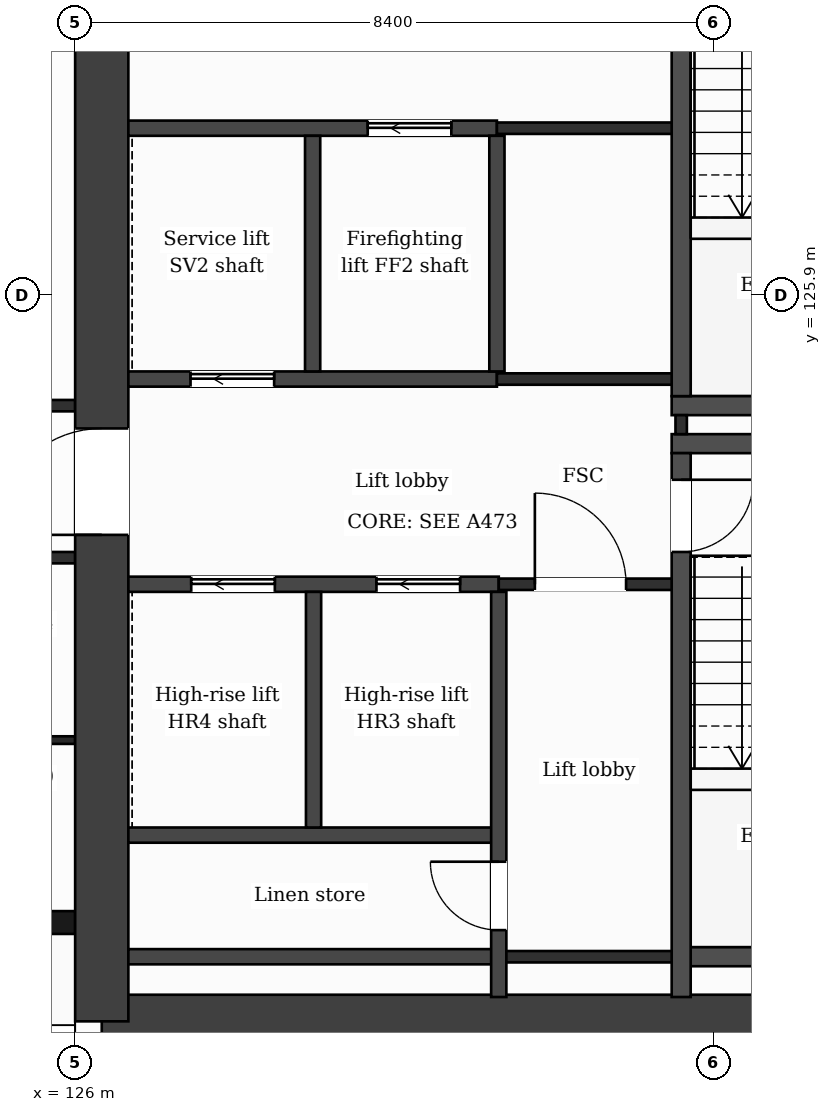
"""IFC4 building model, lengths in metres.
Left out: names, types, materials, properties, quantities, classifications, styles, units other than length and angle.
Written with IfcOpenShell. Run it as: python <this file> out.ifc"""

import sys

from ifc_helpers import new_model, si_unit, direction, frame, frame_2d, origin, place, context, subcontext, project, spatial, rectangle, extrude, element, fill, save


model = new_model("IFC4")
c1 = context("Model", 3, precision=1e-05, world=origin(), true_north=direction((0.0, 1.0)))
c2 = subcontext(c1, "Body", "Model", "MODEL_VIEW")
j1 = project(units=[si_unit("LENGTHUNIT", "METRE"), si_unit("PLANEANGLEUNIT", "RADIAN")], contexts=[c1])
p1 = place(None, origin())
s1 = spatial("IfcSite", under=j1, at=p1, CompositionType="ELEMENT")
p2 = place(p1, origin())
s2 = spatial("IfcBuilding", under=s1, at=p2, CompositionType="ELEMENT")
p3 = place(p2, frame((0.0, 0.0, 296.0)))
s3 = spatial("IfcBuildingStorey", under=s2, at=p3, CompositionType="ELEMENT", Elevation=296.0)
p4 = place(p3, frame((139.977, 116.35, 0.0), z_axis=(0.0, 0.0, 1.0), x_axis=(-1.0, 0.0, 0.0)))
e1 = element("IfcWall", 1, at=p4, inside=s3, PredefinedType="SHEAR", context=c2, shape_type="SweptSolid", body=[
    extrude(rectangle(XDim=13.626, YDim=0.7, at=frame_2d((6.813, 0.0))), origin(), (0.0, 0.0, 1.0), 3.7),
])
p5 = place(p3, frame((126.35, 116.35, 0.0), z_axis=(0.0, 0.0, 1.0), x_axis=(0.0, 1.0, 0.0)))
e2 = element("IfcWall", 2, at=p5, inside=s3, PredefinedType="SHEAR", context=c2, shape_type="SweptSolid", body=[
    extrude(rectangle(XDim=15.7, YDim=0.7, at=frame_2d((7.85, 0.0))), origin(), (0.0, 0.0, 1.0), 3.7),
])
p6 = place(p5, frame((6.4, 0.0, 0.0)))
e3 = element("IfcOpeningElement", 3, at=p6, cuts=e2, PredefinedType="OPENING", context=c2, shape_type="SweptSolid", body=[
    extrude(rectangle(XDim=1.4, YDim=2.1, at=frame_2d((0.7, 1.05))), frame((0.0, 0.36, 0.0), z_axis=(0.0, -1.0, 0.0), x_axis=(1.0, 0.0, 0.0)), (0.0, 0.0, 1.0), 0.72),
])
p7 = place(p3, frame((100.8, 117.65, 0.0), z_axis=(0.0, 0.0, 1.0), x_axis=(1.0, 0.0, 0.0)))
e4 = element("IfcWall", 4, at=p7, inside=s3, PredefinedType="SOLIDWALL", context=c2, shape_type="SweptSolid", body=[
    extrude(rectangle(XDim=25.2, YDim=0.3, at=frame_2d((12.6, 0.0))), origin(), (0.0, 0.0, 1.0), 3.38),
])
p8 = place(p7, frame((1.55, 0.0, 0.9)))
e5 = element("IfcOpeningElement", 5, at=p8, cuts=e4, PredefinedType="OPENING", context=c2, shape_type="SweptSolid", body=[
    extrude(rectangle(XDim=1.2, YDim=2.1, at=frame_2d((0.6, 1.05))), frame((0.0, 0.16, 0.0), z_axis=(0.0, -1.0, 0.0), x_axis=(1.0, 0.0, 0.0)), (0.0, 0.0, 1.0), 0.32),
])
p9 = place(p7, frame((5.7, 0.0, 0.9)))
e6 = element("IfcOpeningElement", 6, at=p9, cuts=e4, PredefinedType="OPENING", context=c2, shape_type="SweptSolid", body=[
    extrude(rectangle(XDim=1.2, YDim=2.1, at=frame_2d((0.6, 1.05))), frame((0.0, 0.16, 0.0), z_axis=(0.0, -1.0, 0.0), x_axis=(1.0, 0.0, 0.0)), (0.0, 0.0, 1.0), 0.32),
])
p10 = place(p7, frame((9.0, 0.0, 0.0)))
e7 = element("IfcOpeningElement", 7, at=p10, cuts=e4, PredefinedType="OPENING", context=c2, shape_type="SweptSolid", body=[
    extrude(rectangle(XDim=1.2, YDim=2.4, at=frame_2d((0.6, 1.2))), frame((0.0, 0.16, 0.0), z_axis=(0.0, -1.0, 0.0), x_axis=(1.0, 0.0, 0.0)), (0.0, 0.0, 1.0), 0.32),
])
p11 = place(p7, frame((10.8, 0.0, 0.9)))
e8 = element("IfcOpeningElement", 8, at=p11, cuts=e4, PredefinedType="OPENING", context=c2, shape_type="SweptSolid", body=[
    extrude(rectangle(XDim=1.2, YDim=2.1, at=frame_2d((0.6, 1.05))), frame((0.0, 0.16, 0.0), z_axis=(0.0, -1.0, 0.0), x_axis=(1.0, 0.0, 0.0)), (0.0, 0.0, 1.0), 0.32),
])
p12 = place(p7, frame((13.5, 0.0, 0.9)))
e9 = element("IfcOpeningElement", 9, at=p12, cuts=e4, PredefinedType="OPENING", context=c2, shape_type="SweptSolid", body=[
    extrude(rectangle(XDim=2.4, YDim=2.1, at=frame_2d((1.2, 1.05))), frame((0.0, 0.16, 0.0), z_axis=(0.0, -1.0, 0.0), x_axis=(1.0, 0.0, 0.0)), (0.0, 0.0, 1.0), 0.32),
])
p13 = place(p7, frame((17.4, 0.0, 0.0)))
e10 = element("IfcOpeningElement", 10, at=p13, cuts=e4, PredefinedType="OPENING", context=c2, shape_type="SweptSolid", body=[
    extrude(rectangle(XDim=1.2, YDim=2.4, at=frame_2d((0.6, 1.2))), frame((0.0, 0.16, 0.0), z_axis=(0.0, -1.0, 0.0), x_axis=(1.0, 0.0, 0.0)), (0.0, 0.0, 1.0), 0.32),
])
p14 = place(p7, frame((19.2, 0.0, 0.9)))
e11 = element("IfcOpeningElement", 11, at=p14, cuts=e4, PredefinedType="OPENING", context=c2, shape_type="SweptSolid", body=[
    extrude(rectangle(XDim=1.2, YDim=2.1, at=frame_2d((0.6, 1.05))), frame((0.0, 0.16, 0.0), z_axis=(0.0, -1.0, 0.0), x_axis=(1.0, 0.0, 0.0)), (0.0, 0.0, 1.0), 0.32),
])
p15 = place(p7, frame((21.85, 0.0, 0.9)))
e12 = element("IfcOpeningElement", 12, at=p15, cuts=e4, PredefinedType="OPENING", context=c2, shape_type="SweptSolid", body=[
    extrude(rectangle(XDim=2.4, YDim=2.1, at=frame_2d((1.2, 1.05))), frame((0.0, 0.16, 0.0), z_axis=(0.0, -1.0, 0.0), x_axis=(1.0, 0.0, 0.0)), (0.0, 0.0, 1.0), 0.32),
])
p16 = place(p3, frame((126.7, 117.2, 0.0), z_axis=(0.0, 0.0, 1.0), x_axis=(1.0, 0.0, 0.0)))
e13 = element("IfcWall", 13, at=p16, inside=s3, PredefinedType="PARTITIONING", context=c2, shape_type="SweptSolid", body=[
    extrude(rectangle(XDim=4.873, YDim=0.2, at=frame_2d((2.437, 0.0))), origin(), (0.0, 0.0, 1.0), 3.38),
])
p17 = place(p3, frame((131.573, 117.2, 0.0), z_axis=(0.0, 0.0, 1.0), x_axis=(1.0, 0.0, 0.0)))
e14 = element("IfcWall", 14, at=p17, inside=s3, PredefinedType="PARTITIONING", context=c2, shape_type="SweptSolid", body=[
    extrude(rectangle(XDim=2.4, YDim=0.15, at=frame_2d((1.2, 0.0))), origin(), (0.0, 0.0, 1.0), 3.38),
])
p18 = place(p3, frame((133.973, 117.2, 0.0), z_axis=(0.0, 0.0, 1.0), x_axis=(1.0, 0.0, 0.0)))
e15 = element("IfcWall", 15, at=p18, inside=s3, PredefinedType="PARTITIONING", context=c2, shape_type="SweptSolid", body=[
    extrude(rectangle(XDim=3.275, YDim=0.25, at=frame_2d((1.638, 0.0))), origin(), (0.0, 0.0, 1.0), 3.38),
])
p19 = place(p3, frame((126.7, 118.8, 0.0), z_axis=(0.0, 0.0, 1.0), x_axis=(1.0, 0.0, 0.0)))
e16 = element("IfcWall", 16, at=p19, inside=s3, PredefinedType="PARTITIONING", context=c2, shape_type="SweptSolid", body=[
    extrude(rectangle(XDim=4.873, YDim=0.2, at=frame_2d((2.437, 0.0))), origin(), (0.0, 0.0, 1.0), 3.38),
])
p20 = place(p3, frame((123.25, 120.05, 0.0), z_axis=(0.0, 0.0, 1.0), x_axis=(1.0, 0.0, 0.0)))
e17 = element("IfcWall", 17, at=p20, inside=s3, PredefinedType="PARTITIONING", context=c2, shape_type="SweptSolid", body=[
    extrude(rectangle(XDim=2.75, YDim=0.1, at=frame_2d((1.375, 0.0))), origin(), (0.0, 0.0, 1.0), 3.38),
])
p21 = place(p20, frame((1.0, 0.0, 0.0)))
e18 = element("IfcOpeningElement", 18, at=p21, cuts=e17, PredefinedType="OPENING", context=c2, shape_type="SweptSolid", body=[
    extrude(rectangle(XDim=0.8, YDim=2.1, at=frame_2d((0.4, 1.05))), frame((0.0, 0.06, 0.0), z_axis=(0.0, -1.0, 0.0), x_axis=(1.0, 0.0, 0.0)), (0.0, 0.0, 1.0), 0.12),
])
p22 = place(p3, frame((126.7, 122.1, 0.0), z_axis=(0.0, 0.0, 1.0), x_axis=(1.0, 0.0, 0.0)))
e19 = element("IfcWall", 19, at=p22, inside=s3, PredefinedType="PARTITIONING", context=c2, shape_type="SweptSolid", body=[
    extrude(rectangle(XDim=4.873, YDim=0.2, at=frame_2d((2.437, 0.0))), origin(), (0.0, 0.0, 1.0), 3.38),
])
p23 = place(p22, frame((3.264, 0.0, 0.0)))
e20 = element("IfcOpeningElement", 20, at=p23, cuts=e19, PredefinedType="OPENING", context=c2, shape_type="SweptSolid", body=[
    extrude(rectangle(XDim=1.1, YDim=2.1, at=frame_2d((0.55, 1.05))), frame((0.0, 0.11, 0.0), z_axis=(0.0, -1.0, 0.0), x_axis=(1.0, 0.0, 0.0)), (0.0, 0.0, 1.0), 0.22),
])
p24 = place(p22, frame((0.827, 0.0, 0.0)))
e21 = element("IfcOpeningElement", 21, at=p24, cuts=e19, PredefinedType="OPENING", context=c2, shape_type="SweptSolid", body=[
    extrude(rectangle(XDim=1.1, YDim=2.1, at=frame_2d((0.55, 1.05))), frame((0.0, 0.11, 0.0), z_axis=(0.0, -1.0, 0.0), x_axis=(1.0, 0.0, 0.0)), (0.0, 0.0, 1.0), 0.22),
])
p25 = place(p3, frame((131.573, 122.1, 0.0), z_axis=(0.0, 0.0, 1.0), x_axis=(1.0, 0.0, 0.0)))
e22 = element("IfcWall", 22, at=p25, inside=s3, PredefinedType="PARTITIONING", context=c2, shape_type="SweptSolid", body=[
    extrude(rectangle(XDim=2.4, YDim=0.15, at=frame_2d((1.2, 0.0))), origin(), (0.0, 0.0, 1.0), 3.38),
])
p26 = place(p25, frame((0.475, 0.0, 0.0)))
e23 = element("IfcOpeningElement", 23, at=p26, cuts=e22, PredefinedType="OPENING", context=c2, shape_type="SweptSolid", body=[
    extrude(rectangle(XDim=1.2, YDim=2.1, at=frame_2d((0.6, 1.05))), frame((0.0, 0.085, 0.0), z_axis=(0.0, -1.0, 0.0), x_axis=(1.0, 0.0, 0.0)), (0.0, 0.0, 1.0), 0.17),
])
p27 = place(p3, frame((100.8, 122.45, 0.0), z_axis=(0.0, 0.0, 1.0), x_axis=(1.0, 0.0, 0.0)))
e24 = element("IfcWall", 24, at=p27, inside=s3, PredefinedType="PARTITIONING", context=c2, shape_type="SweptSolid", body=[
    extrude(rectangle(XDim=25.2, YDim=0.15, at=frame_2d((12.6, 0.0))), origin(), (0.0, 0.0, 1.0), 3.38),
])
p28 = place(p27, frame((1.6, 0.0, 0.0)))
e25 = element("IfcOpeningElement", 25, at=p28, cuts=e24, PredefinedType="OPENING", context=c2, shape_type="SweptSolid", body=[
    extrude(rectangle(XDim=1.0, YDim=2.1, at=frame_2d((0.5, 1.05))), frame((0.0, 0.085, 0.0), z_axis=(0.0, -1.0, 0.0), x_axis=(1.0, 0.0, 0.0)), (0.0, 0.0, 1.0), 0.17),
])
p29 = place(p27, frame((11.12, 0.0, 0.0)))
e26 = element("IfcOpeningElement", 26, at=p29, cuts=e24, PredefinedType="OPENING", context=c2, shape_type="SweptSolid", body=[
    extrude(rectangle(XDim=0.95, YDim=2.1, at=frame_2d((0.475, 1.05))), frame((0.0, 0.085, 0.0), z_axis=(0.0, -1.0, 0.0), x_axis=(1.0, 0.0, 0.0)), (0.0, 0.0, 1.0), 0.17),
])
p30 = place(p27, frame((13.05, 0.0, 0.0)))
e27 = element("IfcOpeningElement", 27, at=p30, cuts=e24, PredefinedType="OPENING", context=c2, shape_type="SweptSolid", body=[
    extrude(rectangle(XDim=1.0, YDim=2.1, at=frame_2d((0.5, 1.05))), frame((0.0, 0.085, 0.0), z_axis=(0.0, -1.0, 0.0), x_axis=(1.0, 0.0, 0.0)), (0.0, 0.0, 1.0), 0.17),
])
p31 = place(p27, frame((19.61, 0.0, 0.0)))
e28 = element("IfcOpeningElement", 28, at=p31, cuts=e24, PredefinedType="OPENING", context=c2, shape_type="SweptSolid", body=[
    extrude(rectangle(XDim=0.95, YDim=2.1, at=frame_2d((0.475, 1.05))), frame((0.0, 0.085, 0.0), z_axis=(0.0, -1.0, 0.0), x_axis=(1.0, 0.0, 0.0)), (0.0, 0.0, 1.0), 0.17),
])
p32 = place(p27, frame((21.275, 0.0, 0.0)))
e29 = element("IfcOpeningElement", 29, at=p32, cuts=e24, PredefinedType="OPENING", context=c2, shape_type="SweptSolid", body=[
    extrude(rectangle(XDim=0.95, YDim=2.1, at=frame_2d((0.475, 1.05))), frame((0.0, 0.085, 0.0), z_axis=(0.0, -1.0, 0.0), x_axis=(1.0, 0.0, 0.0)), (0.0, 0.0, 1.0), 0.17),
])
for number, where, z_axis, x_axis in (
    (30, (133.848, 123.95, 0.0), (0.0, 0.0, 1.0), (1.0, 0.0, 0.0)),
    (31, (133.848, 124.45, 0.0), (0.0, 0.0, 1.0), (1.0, 0.0, 0.0)),
):
    element("IfcWall", number, at=place(p3, frame(where, z_axis=z_axis, x_axis=x_axis)), inside=s3, PredefinedType="PARTITIONING", context=c2, shape_type="SweptSolid", body=[
        extrude(rectangle(XDim=3.4, YDim=0.25, at=frame_2d((1.7, 0.0))), origin(), (0.0, 0.0, 1.0), 3.38),
    ])
p33 = place(p3, frame((100.8, 124.45, 0.0), z_axis=(0.0, 0.0, 1.0), x_axis=(1.0, 0.0, 0.0)))
e32 = element("IfcWall", 32, at=p33, inside=s3, PredefinedType="PARTITIONING", context=c2, shape_type="SweptSolid", body=[
    extrude(rectangle(XDim=25.2, YDim=0.15, at=frame_2d((12.6, 0.0))), origin(), (0.0, 0.0, 1.0), 3.38),
])
p34 = place(p33, frame((1.85, 0.0, 0.0)))
e33 = element("IfcOpeningElement", 33, at=p34, cuts=e32, PredefinedType="OPENING", context=c2, shape_type="SweptSolid", body=[
    extrude(rectangle(XDim=1.0, YDim=2.1, at=frame_2d((0.5, 1.05))), frame((0.0, 0.085, 0.0), z_axis=(0.0, -1.0, 0.0), x_axis=(1.0, 0.0, 0.0)), (0.0, 0.0, 1.0), 0.17),
])
p35 = place(p33, frame((6.425, 0.0, 0.0)))
e34 = element("IfcOpeningElement", 34, at=p35, cuts=e32, PredefinedType="OPENING", context=c2, shape_type="SweptSolid", body=[
    extrude(rectangle(XDim=1.0, YDim=2.1, at=frame_2d((0.5, 1.05))), frame((0.0, 0.085, 0.0), z_axis=(0.0, -1.0, 0.0), x_axis=(1.0, 0.0, 0.0)), (0.0, 0.0, 1.0), 0.17),
])
p36 = place(p33, frame((9.4, 0.0, 0.0)))
e35 = element("IfcOpeningElement", 35, at=p36, cuts=e32, PredefinedType="OPENING", context=c2, shape_type="SweptSolid", body=[
    extrude(rectangle(XDim=1.0, YDim=2.1, at=frame_2d((0.5, 1.05))), frame((0.0, 0.085, 0.0), z_axis=(0.0, -1.0, 0.0), x_axis=(1.0, 0.0, 0.0)), (0.0, 0.0, 1.0), 0.17),
])
p37 = place(p33, frame((14.825, 0.0, 0.0)))
e36 = element("IfcOpeningElement", 36, at=p37, cuts=e32, PredefinedType="OPENING", context=c2, shape_type="SweptSolid", body=[
    extrude(rectangle(XDim=1.0, YDim=2.1, at=frame_2d((0.5, 1.05))), frame((0.0, 0.085, 0.0), z_axis=(0.0, -1.0, 0.0), x_axis=(1.0, 0.0, 0.0)), (0.0, 0.0, 1.0), 0.17),
])
p38 = place(p33, frame((18.825, 0.0, 0.0)))
e37 = element("IfcOpeningElement", 37, at=p38, cuts=e32, PredefinedType="OPENING", context=c2, shape_type="SweptSolid", body=[
    extrude(rectangle(XDim=1.0, YDim=2.1, at=frame_2d((0.5, 1.05))), frame((0.0, 0.085, 0.0), z_axis=(0.0, -1.0, 0.0), x_axis=(1.0, 0.0, 0.0)), (0.0, 0.0, 1.0), 0.17),
])
p39 = place(p3, frame((126.7, 124.8, 0.0), z_axis=(0.0, 0.0, 1.0), x_axis=(1.0, 0.0, 0.0)))
e38 = element("IfcWall", 38, at=p39, inside=s3, PredefinedType="PARTITIONING", context=c2, shape_type="SweptSolid", body=[
    extrude(rectangle(XDim=4.849, YDim=0.2, at=frame_2d((2.424, 0.0))), origin(), (0.0, 0.0, 1.0), 3.38),
])
p40 = place(p39, frame((0.818, 0.0, 0.0)))
e39 = element("IfcOpeningElement", 39, at=p40, cuts=e38, PredefinedType="OPENING", context=c2, shape_type="SweptSolid", body=[
    extrude(rectangle(XDim=1.1, YDim=2.1, at=frame_2d((0.55, 1.05))), frame((0.0, 0.11, 0.0), z_axis=(0.0, -1.0, 0.0), x_axis=(1.0, 0.0, 0.0)), (0.0, 0.0, 1.0), 0.22),
])
p41 = place(p3, frame((131.549, 124.8, 0.0), z_axis=(0.0, 0.0, 1.0), x_axis=(1.0, 0.0, 0.0)))
e40 = element("IfcWall", 40, at=p41, inside=s3, PredefinedType="PARTITIONING", context=c2, shape_type="SweptSolid", body=[
    extrude(rectangle(XDim=2.549, YDim=0.15, at=frame_2d((1.275, 0.0))), origin(), (0.0, 0.0, 1.0), 3.38),
])
p42 = place(p3, frame((126.7, 128.1, 0.0), z_axis=(0.0, 0.0, 1.0), x_axis=(1.0, 0.0, 0.0)))
e41 = element("IfcWall", 41, at=p42, inside=s3, PredefinedType="PARTITIONING", context=c2, shape_type="SweptSolid", body=[
    extrude(rectangle(XDim=4.849, YDim=0.2, at=frame_2d((2.424, 0.0))), origin(), (0.0, 0.0, 1.0), 3.38),
])
p43 = place(p42, frame((3.149, 0.0, 0.0)))
e42 = element("IfcOpeningElement", 42, at=p43, cuts=e41, PredefinedType="OPENING", context=c2, shape_type="SweptSolid", body=[
    extrude(rectangle(XDim=1.1, YDim=2.1, at=frame_2d((0.55, 1.05))), frame((0.0, 0.11, 0.0), z_axis=(0.0, -1.0, 0.0), x_axis=(1.0, 0.0, 0.0)), (0.0, 0.0, 1.0), 0.22),
])
p44 = place(p3, frame((131.549, 128.1, 0.0), z_axis=(0.0, 0.0, 1.0), x_axis=(1.0, 0.0, 0.0)))
e43 = element("IfcWall", 43, at=p44, inside=s3, PredefinedType="PARTITIONING", context=c2, shape_type="SweptSolid", body=[
    extrude(rectangle(XDim=2.424, YDim=0.15, at=frame_2d((1.212, 0.0))), origin(), (0.0, 0.0, 1.0), 3.38),
])
for number, where, z_axis, x_axis in (
    (44, (129.124, 124.9, 0.0), (0.0, 0.0, 1.0), (0.0, 1.0, 0.0)),
    (45, (129.136, 118.9, 0.0), (0.0, 0.0, 1.0), (0.0, 1.0, 0.0)),
    (46, (131.549, 124.9, 0.0), (0.0, 0.0, 1.0), (0.0, 1.0, 0.0)),
):
    element("IfcWall", number, at=place(p3, frame(where, z_axis=z_axis, x_axis=x_axis)), inside=s3, PredefinedType="PARTITIONING", context=c2, shape_type="SweptSolid", body=[
        extrude(rectangle(XDim=3.1, YDim=0.2, at=frame_2d((1.55, 0.0))), origin(), (0.0, 0.0, 1.0), 3.38),
    ])
p45 = place(p3, frame((131.573, 116.67, 0.0), z_axis=(0.0, 0.0, 1.0), x_axis=(0.0, 1.0, 0.0)))
e47 = element("IfcWall", 47, at=p45, inside=s3, PredefinedType="PARTITIONING", context=c2, shape_type="SweptSolid", body=[
    extrude(rectangle(XDim=5.33, YDim=0.2, at=frame_2d((2.665, 0.0))), origin(), (0.0, 0.0, 1.0), 3.38),
])
p46 = place(p45, frame((0.88, 0.0, 0.0)))
e48 = element("IfcOpeningElement", 48, at=p46, cuts=e47, PredefinedType="OPENING", context=c2, shape_type="SweptSolid", body=[
    extrude(rectangle(XDim=0.9, YDim=2.1, at=frame_2d((0.45, 1.05))), frame((0.0, 0.11, 0.0), z_axis=(0.0, -1.0, 0.0), x_axis=(1.0, 0.0, 0.0)), (0.0, 0.0, 1.0), 0.22),
])
p47 = place(p3, frame((133.973, 124.075, 0.0), z_axis=(0.0, 0.0, 1.0), x_axis=(0.0, 1.0, 0.0)))
e49 = element("IfcWall", 49, at=p47, inside=s3, PredefinedType="PARTITIONING", context=c2, shape_type="SweptSolid", body=[
    extrude(rectangle(XDim=0.25, YDim=0.15, at=frame_2d((0.125, 0.0))), origin(), (0.0, 0.0, 1.0), 3.38),
])
p48 = place(p3, frame((133.973, 116.67, 0.0), z_axis=(0.0, 0.0, 1.0), x_axis=(0.0, 1.0, 0.0)))
e50 = element("IfcWall", 50, at=p48, inside=s3, PredefinedType="PARTITIONING", context=c2, shape_type="SweptSolid", body=[
    extrude(rectangle(XDim=7.155, YDim=0.25, at=frame_2d((3.578, 0.0))), origin(), (0.0, 0.0, 1.0), 3.38),
])
p49 = place(p48, frame((5.855, 0.0, 0.0)))
e51 = element("IfcOpeningElement", 51, at=p49, cuts=e50, PredefinedType="OPENING", context=c2, shape_type="SweptSolid", body=[
    extrude(rectangle(XDim=0.95, YDim=2.1, at=frame_2d((0.475, 1.05))), frame((0.0, 0.135, 0.0), z_axis=(0.0, -1.0, 0.0), x_axis=(1.0, 0.0, 0.0)), (0.0, 0.0, 1.0), 0.27),
])
p50 = place(p3, frame((133.973, 124.575, 0.0), z_axis=(0.0, 0.0, 1.0), x_axis=(0.0, 1.0, 0.0)))
e52 = element("IfcWall", 52, at=p50, inside=s3, PredefinedType="PARTITIONING", context=c2, shape_type="SweptSolid", body=[
    extrude(rectangle(XDim=7.155, YDim=0.25, at=frame_2d((3.578, 0.0))), origin(), (0.0, 0.0, 1.0), 3.38),
])
p51 = place(p50, frame((5.325, 0.0, 0.0)))
e53 = element("IfcOpeningElement", 53, at=p51, cuts=e52, PredefinedType="OPENING", context=c2, shape_type="SweptSolid", body=[
    extrude(rectangle(XDim=1.0, YDim=2.1, at=frame_2d((0.5, 1.05))), frame((0.0, 0.135, 0.0), z_axis=(0.0, -1.0, 0.0), x_axis=(1.0, 0.0, 0.0)), (0.0, 0.0, 1.0), 0.27),
])
p52 = place(p26, origin())
e54 = element("IfcDoor", 54, at=p52, inside=s3, OperationType="SINGLE_SWING_LEFT", PredefinedType="DOOR", context=c2, shape_type="SweptSolid", body=[
    extrude(rectangle(XDim=1.2, YDim=2.1, at=frame_2d((0.6, 1.05))), frame((0.0, 0.025, 0.0), z_axis=(0.0, -1.0, 0.0), x_axis=(1.0, 0.0, 0.0)), (0.0, 0.0, 1.0), 0.05),
])
fill(e23, e54)
p53 = place(p23, origin())
e55 = element("IfcDoor", 55, at=p53, inside=s3, OperationType="SLIDING_TO_LEFT", PredefinedType="DOOR", context=c2, shape_type="SweptSolid", body=[
    extrude(rectangle(XDim=1.1, YDim=2.1, at=frame_2d((0.55, 1.05))), frame((0.0, 0.025, 0.0), z_axis=(0.0, -1.0, 0.0), x_axis=(1.0, 0.0, 0.0)), (0.0, 0.0, 1.0), 0.05),
])
fill(e20, e55)
p54 = place(p24, origin())
e56 = element("IfcDoor", 56, at=p54, inside=s3, OperationType="SLIDING_TO_LEFT", PredefinedType="DOOR", context=c2, shape_type="SweptSolid", body=[
    extrude(rectangle(XDim=1.1, YDim=2.1, at=frame_2d((0.55, 1.05))), frame((0.0, 0.025, 0.0), z_axis=(0.0, -1.0, 0.0), x_axis=(1.0, 0.0, 0.0)), (0.0, 0.0, 1.0), 0.05),
])
fill(e21, e56)
p55 = place(p43, origin())
e57 = element("IfcDoor", 57, at=p55, inside=s3, OperationType="SLIDING_TO_LEFT", PredefinedType="DOOR", context=c2, shape_type="SweptSolid", body=[
    extrude(rectangle(XDim=1.1, YDim=2.1, at=frame_2d((0.55, 1.05))), frame((0.0, 0.025, 0.0), z_axis=(0.0, -1.0, 0.0), x_axis=(1.0, 0.0, 0.0)), (0.0, 0.0, 1.0), 0.05),
])
fill(e42, e57)
p56 = place(p40, origin())
e58 = element("IfcDoor", 58, at=p56, inside=s3, OperationType="SLIDING_TO_LEFT", PredefinedType="DOOR", context=c2, shape_type="SweptSolid", body=[
    extrude(rectangle(XDim=1.1, YDim=2.1, at=frame_2d((0.55, 1.05))), frame((0.0, 0.025, 0.0), z_axis=(0.0, -1.0, 0.0), x_axis=(1.0, 0.0, 0.0)), (0.0, 0.0, 1.0), 0.05),
])
fill(e39, e58)
p57 = place(p49, origin())
e59 = element("IfcDoor", 59, at=p57, inside=s3, OperationType="SINGLE_SWING_RIGHT", PredefinedType="DOOR", context=c2, shape_type="SweptSolid", body=[
    extrude(rectangle(XDim=0.95, YDim=2.1, at=frame_2d((0.475, 1.05))), frame((0.0, 0.025, 0.0), z_axis=(0.0, -1.0, 0.0), x_axis=(1.0, 0.0, 0.0)), (0.0, 0.0, 1.0), 0.05),
])
fill(e51, e59)
p58 = place(p46, origin())
e60 = element("IfcDoor", 60, at=p58, inside=s3, OperationType="SINGLE_SWING_RIGHT", PredefinedType="DOOR", context=c2, shape_type="SweptSolid", body=[
    extrude(rectangle(XDim=0.9, YDim=2.1, at=frame_2d((0.45, 1.05))), frame((0.0, 0.025, 0.0), z_axis=(0.0, -1.0, 0.0), x_axis=(1.0, 0.0, 0.0)), (0.0, 0.0, 1.0), 0.05),
])
fill(e48, e60)
p59 = place(p6, origin())
e61 = element("IfcDoor", 61, at=p59, inside=s3, OperationType="SINGLE_SWING_LEFT", PredefinedType="DOOR", context=c2, shape_type="SweptSolid", body=[
    extrude(rectangle(XDim=1.4, YDim=2.1, at=frame_2d((0.7, 1.05))), frame((0.0, 0.025, 0.0), z_axis=(0.0, -1.0, 0.0), x_axis=(1.0, 0.0, 0.0)), (0.0, 0.0, 1.0), 0.05),
])
fill(e3, e61)
save(model, sys.argv[1])
